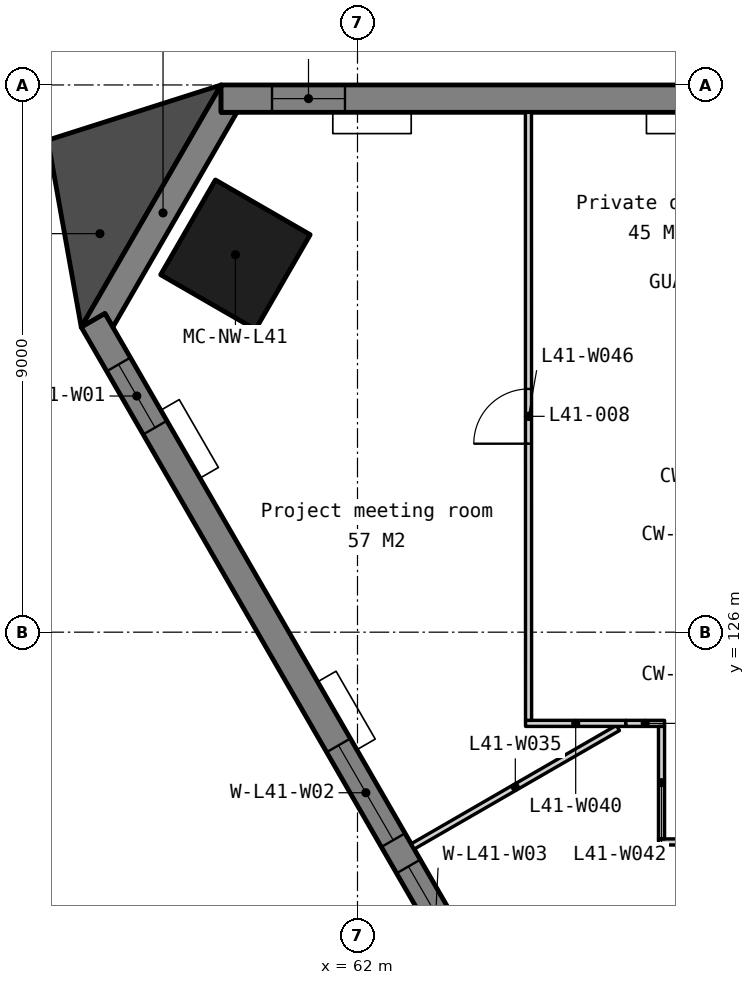
"""IFC4 building model, lengths in metres.
Left out: names, types, materials, properties, quantities, classifications, styles, units other than length and angle.
Written with IfcOpenShell. Run it as: python <this file> out.ifc"""

import sys

from ifc_helpers import new_model, si_unit, direction, frame, frame_2d, origin, origin_2d, place, context, subcontext, project, spatial, polyline, rectangle, outline, extrude, element, fill, save


model = new_model("IFC4")
c1 = context("Model", 3, precision=1e-05, world=origin(), true_north=direction((0.0, 1.0)))
c2 = subcontext(c1, "Body", "Model", "MODEL_VIEW")
j1 = project(units=[si_unit("LENGTHUNIT", "METRE"), si_unit("PLANEANGLEUNIT", "RADIAN")], contexts=[c1])
p1 = place(None, origin())
s1 = spatial("IfcSite", under=j1, at=p1, CompositionType="ELEMENT")
p2 = place(p1, origin())
s2 = spatial("IfcBuilding", under=s1, at=p2, CompositionType="ELEMENT")
p3 = place(p2, frame((0.0, 0.0, 163.7)))
s3 = spatial("IfcBuildingStorey", under=s2, at=p3, CompositionType="ELEMENT", Elevation=163.7)
p4 = place(p3, frame((59.993, 132.208, 0.0), z_axis=(0.0, 0.0, 1.0), x_axis=(-0.5, -0.866025403784, 0.0)))
e1 = element("IfcColumn", 1, at=p4, inside=s3, PredefinedType="COLUMN", context=c2, shape_type="SweptSolid", body=[
    extrude(rectangle(XDim=1.8, YDim=1.8, at=origin_2d()), origin(), (0.0, 0.0, 1.0), 3.9),
])
p5 = place(p3, frame((0.0, 0.0, -0.15)))
e2 = element("IfcWall", 2, at=p5, inside=s3, PredefinedType="SOLIDWALL", context=c2, shape_type="SweptSolid", body=[
    extrude(outline(polyline([(59.757, 135.0), (59.757, 134.55), (60.017, 134.55), (57.977, 131.016), (57.847, 131.241), (57.457, 131.016), (59.757, 135.0)])), origin(), (0.0, 0.0, 1.0), 3.9),
])
p6 = place(p3, frame((100.243, 134.775, -0.15), z_axis=(0.0, 0.0, 1.0), x_axis=(-1.0, 0.0, 0.0)))
e3 = element("IfcWall", 3, at=p6, inside=s3, PredefinedType="SOLIDWALL", context=c2, shape_type="SweptSolid", body=[
    extrude(outline(polyline([(40.486, 0.0), (40.486, 3.9), (0.0, 3.9), (0.0, 0.0), (40.486, 0.0)])), frame((0.0, 0.225, 0.0), z_axis=(0.0, -1.0, 0.0), x_axis=(1.0, 0.0, 0.0)), (0.0, 0.0, 1.0), 0.45),
])
p7 = place(p6, frame((0.837, 0.0, 0.95)))
e4 = element("IfcOpeningElement", 4, at=p7, cuts=e3, PredefinedType="OPENING", context=c2, shape_type="SweptSolid", body=[
    extrude(rectangle(XDim=1.2, YDim=2.2, at=frame_2d((0.6, 1.1))), frame((0.0, 0.235, 0.0), z_axis=(0.0, -1.0, 0.0), x_axis=(1.0, 0.0, 0.0)), (0.0, 0.0, 1.0), 0.47),
])
p8 = place(p6, frame((8.072, 0.0, 0.95)))
e5 = element("IfcOpeningElement", 5, at=p8, cuts=e3, PredefinedType="OPENING", context=c2, shape_type="SweptSolid", body=[
    extrude(rectangle(XDim=1.8, YDim=2.2, at=frame_2d((0.9, 1.1))), frame((0.0, 0.235, 0.0), z_axis=(0.0, -1.0, 0.0), x_axis=(1.0, 0.0, 0.0)), (0.0, 0.0, 1.0), 0.47),
])
p9 = place(p6, frame((10.372, 0.0, 0.95)))
e6 = element("IfcOpeningElement", 6, at=p9, cuts=e3, PredefinedType="OPENING", context=c2, shape_type="SweptSolid", body=[
    extrude(rectangle(XDim=1.8, YDim=2.2, at=frame_2d((0.9, 1.1))), frame((0.0, 0.235, 0.0), z_axis=(0.0, -1.0, 0.0), x_axis=(1.0, 0.0, 0.0)), (0.0, 0.0, 1.0), 0.47),
])
p10 = place(p6, frame((18.193, 0.0, 0.95)))
e7 = element("IfcOpeningElement", 7, at=p10, cuts=e3, PredefinedType="OPENING", context=c2, shape_type="SweptSolid", body=[
    extrude(rectangle(XDim=1.8, YDim=2.2, at=frame_2d((0.9, 1.1))), frame((0.0, 0.235, 0.0), z_axis=(0.0, -1.0, 0.0), x_axis=(1.0, 0.0, 0.0)), (0.0, 0.0, 1.0), 0.47),
])
p11 = place(p6, frame((20.493, 0.0, 0.95)))
e8 = element("IfcOpeningElement", 8, at=p11, cuts=e3, PredefinedType="OPENING", context=c2, shape_type="SweptSolid", body=[
    extrude(rectangle(XDim=1.8, YDim=2.2, at=frame_2d((0.9, 1.1))), frame((0.0, 0.235, 0.0), z_axis=(0.0, -1.0, 0.0), x_axis=(1.0, 0.0, 0.0)), (0.0, 0.0, 1.0), 0.47),
])
p12 = place(p6, frame((28.315, 0.0, 0.95)))
e9 = element("IfcOpeningElement", 9, at=p12, cuts=e3, PredefinedType="OPENING", context=c2, shape_type="SweptSolid", body=[
    extrude(rectangle(XDim=1.8, YDim=2.2, at=frame_2d((0.9, 1.1))), frame((0.0, 0.235, 0.0), z_axis=(0.0, -1.0, 0.0), x_axis=(1.0, 0.0, 0.0)), (0.0, 0.0, 1.0), 0.47),
])
p13 = place(p6, frame((30.615, 0.0, 0.95)))
e10 = element("IfcOpeningElement", 10, at=p13, cuts=e3, PredefinedType="OPENING", context=c2, shape_type="SweptSolid", body=[
    extrude(rectangle(XDim=1.8, YDim=2.2, at=frame_2d((0.9, 1.1))), frame((0.0, 0.235, 0.0), z_axis=(0.0, -1.0, 0.0), x_axis=(1.0, 0.0, 0.0)), (0.0, 0.0, 1.0), 0.47),
])
p14 = place(p6, frame((38.449, 0.0, 0.95)))
e11 = element("IfcOpeningElement", 11, at=p14, cuts=e3, PredefinedType="OPENING", context=c2, shape_type="SweptSolid", body=[
    extrude(rectangle(XDim=1.2, YDim=2.2, at=frame_2d((0.6, 1.1))), frame((0.0, 0.235, 0.0), z_axis=(0.0, -1.0, 0.0), x_axis=(1.0, 0.0, 0.0)), (0.0, 0.0, 1.0), 0.47),
])
p15 = place(p3, frame((57.652, 131.129, -0.15), z_axis=(0.0, 0.0, 1.0), x_axis=(0.499997369791, -0.866026922331, 0.0)))
e12 = element("IfcWall", 12, at=p15, inside=s3, PredefinedType="SOLIDWALL", context=c2, shape_type="SweptSolid", body=[
    extrude(outline(polyline([(40.486, 0.0), (40.486, 3.9), (0.0, 3.9), (0.0, 0.0), (40.486, 0.0)])), frame((0.0, 0.225, 0.0), z_axis=(0.0, -1.0, 0.0), x_axis=(1.0, 0.0, 0.0)), (0.0, 0.0, 1.0), 0.45),
])
p16 = place(p15, frame((0.837, 0.0, 0.95)))
e13 = element("IfcOpeningElement", 13, at=p16, cuts=e12, PredefinedType="OPENING", context=c2, shape_type="SweptSolid", body=[
    extrude(rectangle(XDim=1.2, YDim=2.2, at=frame_2d((0.6, 1.1))), frame((0.0, 0.235, 0.0), z_axis=(0.0, -1.0, 0.0), x_axis=(1.0, 0.0, 0.0)), (0.0, 0.0, 1.0), 0.47),
])
p17 = place(p15, frame((8.072, 0.0, 0.95)))
e14 = element("IfcOpeningElement", 14, at=p17, cuts=e12, PredefinedType="OPENING", context=c2, shape_type="SweptSolid", body=[
    extrude(rectangle(XDim=1.8, YDim=2.2, at=frame_2d((0.9, 1.1))), frame((0.0, 0.235, 0.0), z_axis=(0.0, -1.0, 0.0), x_axis=(1.0, 0.0, 0.0)), (0.0, 0.0, 1.0), 0.47),
])
p18 = place(p15, frame((10.372, 0.0, 0.95)))
e15 = element("IfcOpeningElement", 15, at=p18, cuts=e12, PredefinedType="OPENING", context=c2, shape_type="SweptSolid", body=[
    extrude(rectangle(XDim=1.8, YDim=2.2, at=frame_2d((0.9, 1.1))), frame((0.0, 0.235, 0.0), z_axis=(0.0, -1.0, 0.0), x_axis=(1.0, 0.0, 0.0)), (0.0, 0.0, 1.0), 0.47),
])
p19 = place(p15, frame((18.193, 0.0, 0.95)))
e16 = element("IfcOpeningElement", 16, at=p19, cuts=e12, PredefinedType="OPENING", context=c2, shape_type="SweptSolid", body=[
    extrude(rectangle(XDim=1.8, YDim=2.2, at=frame_2d((0.9, 1.1))), frame((0.0, 0.235, 0.0), z_axis=(0.0, -1.0, 0.0), x_axis=(1.0, 0.0, 0.0)), (0.0, 0.0, 1.0), 0.47),
])
p20 = place(p15, frame((20.493, 0.0, 0.95)))
e17 = element("IfcOpeningElement", 17, at=p20, cuts=e12, PredefinedType="OPENING", context=c2, shape_type="SweptSolid", body=[
    extrude(rectangle(XDim=1.8, YDim=2.2, at=frame_2d((0.9, 1.1))), frame((0.0, 0.235, 0.0), z_axis=(0.0, -1.0, 0.0), x_axis=(1.0, 0.0, 0.0)), (0.0, 0.0, 1.0), 0.47),
])
p21 = place(p15, frame((28.315, 0.0, 0.95)))
e18 = element("IfcOpeningElement", 18, at=p21, cuts=e12, PredefinedType="OPENING", context=c2, shape_type="SweptSolid", body=[
    extrude(rectangle(XDim=1.8, YDim=2.2, at=frame_2d((0.9, 1.1))), frame((0.0, 0.235, 0.0), z_axis=(0.0, -1.0, 0.0), x_axis=(1.0, 0.0, 0.0)), (0.0, 0.0, 1.0), 0.47),
])
p22 = place(p15, frame((30.615, 0.0, 0.95)))
e19 = element("IfcOpeningElement", 19, at=p22, cuts=e12, PredefinedType="OPENING", context=c2, shape_type="SweptSolid", body=[
    extrude(rectangle(XDim=1.8, YDim=2.2, at=frame_2d((0.9, 1.1))), frame((0.0, 0.235, 0.0), z_axis=(0.0, -1.0, 0.0), x_axis=(1.0, 0.0, 0.0)), (0.0, 0.0, 1.0), 0.47),
])
p23 = place(p15, frame((38.449, 0.0, 0.95)))
e20 = element("IfcOpeningElement", 20, at=p23, cuts=e12, PredefinedType="OPENING", context=c2, shape_type="SweptSolid", body=[
    extrude(rectangle(XDim=1.2, YDim=2.2, at=frame_2d((0.6, 1.1))), frame((0.0, 0.235, 0.0), z_axis=(0.0, -1.0, 0.0), x_axis=(1.0, 0.0, 0.0)), (0.0, 0.0, 1.0), 0.47),
])
p24 = place(p3, frame((0.0, 0.0, -0.15)))
e21 = element("IfcWall", 21, at=p24, inside=s3, PredefinedType="SOLIDWALL", context=c2, shape_type="SweptSolid", body=[
    extrude(outline(polyline([(59.757, 135.0), (56.908, 134.093), (57.457, 131.016), (59.757, 135.0)])), origin(), (0.0, 0.0, 1.0), 3.9),
])
p25 = place(p3, frame((65.438, 118.093, 0.0), z_axis=(0.0, 0.0, 1.0), x_axis=(0.866029768103, 0.499992440702, 0.0)))
e22 = element("IfcWall", 22, at=p25, inside=s3, PredefinedType="PARTITIONING", context=c2, shape_type="SweptSolid", body=[
    extrude(rectangle(XDim=8.089, YDim=0.1, at=frame_2d((4.044, 0.0))), origin(), (0.0, 0.0, 1.0), 3.75),
])
p26 = place(p25, frame((3.594, 0.0, 0.0)))
e23 = element("IfcOpeningElement", 23, at=p26, cuts=e22, PredefinedType="OPENING", context=c2, shape_type="SweptSolid", body=[
    extrude(rectangle(XDim=0.9, YDim=2.1, at=frame_2d((0.45, 1.05))), frame((0.0, 0.06, 0.0), z_axis=(0.0, -1.0, 0.0), x_axis=(1.0, 0.0, 0.0)), (0.0, 0.0, 1.0), 0.12),
])
p27 = place(p3, frame((62.907, 122.476, 0.0), z_axis=(0.0, 0.0, 1.0), x_axis=(0.866014543207, 0.500018810599, 0.0)))
e24 = element("IfcWall", 24, at=p27, inside=s3, PredefinedType="PARTITIONING", context=c2, shape_type="SweptSolid", body=[
    extrude(rectangle(XDim=3.898, YDim=0.1, at=frame_2d((1.949, 0.0))), origin(), (0.0, 0.0, 1.0), 3.75),
])
p28 = place(p3, frame((66.95, 122.55, 0.0), z_axis=(0.0, 0.0, 1.0), x_axis=(1.0, 0.0, 0.0)))
e25 = element("IfcWall", 25, at=p28, inside=s3, PredefinedType="PARTITIONING", context=c2, shape_type="SweptSolid", body=[
    extrude(rectangle(XDim=2.05, YDim=0.1, at=frame_2d((1.025, 0.0))), origin(), (0.0, 0.0, 1.0), 3.75),
])
p29 = place(p28, frame((0.575, 0.0, 0.0)))
e26 = element("IfcOpeningElement", 26, at=p29, cuts=e25, PredefinedType="OPENING", context=c2, shape_type="SweptSolid", body=[
    extrude(rectangle(XDim=0.9, YDim=2.1, at=frame_2d((0.45, 1.05))), frame((0.0, 0.06, 0.0), z_axis=(0.0, -1.0, 0.0), x_axis=(1.0, 0.0, 0.0)), (0.0, 0.0, 1.0), 0.12),
])
p30 = place(p3, frame((64.763, 124.5, 0.0), z_axis=(0.0, 0.0, 1.0), x_axis=(1.0, 0.0, 0.0)))
e27 = element("IfcWall", 27, at=p30, inside=s3, PredefinedType="PARTITIONING", context=c2, shape_type="SweptSolid", body=[
    extrude(rectangle(XDim=1.65, YDim=0.1, at=frame_2d((0.825, 0.0))), origin(), (0.0, 0.0, 1.0), 3.75),
])
p31 = place(p3, frame((66.414, 124.5, 0.0), z_axis=(0.0, 0.0, 1.0), x_axis=(1.0, 0.0, 0.0)))
e28 = element("IfcWall", 28, at=p31, inside=s3, PredefinedType="PARTITIONING", context=c2, shape_type="SweptSolid", body=[
    extrude(rectangle(XDim=0.636, YDim=0.1, at=frame_2d((0.318, 0.0))), origin(), (0.0, 0.0, 1.0), 3.75),
])
p32 = place(p3, frame((67.0, 122.6, 0.0), z_axis=(0.0, 0.0, 1.0), x_axis=(0.0, 1.0, 0.0)))
e29 = element("IfcWall", 29, at=p32, inside=s3, PredefinedType="PARTITIONING", context=c2, shape_type="SweptSolid", body=[
    extrude(rectangle(XDim=1.85, YDim=0.1, at=frame_2d((0.925, 0.0))), origin(), (0.0, 0.0, 1.0), 3.75),
])
p33 = place(p3, frame((64.813, 124.55, 0.0), z_axis=(0.0, 0.0, 1.0), x_axis=(-0.000195312496, 0.999999980927, 0.0)))
e30 = element("IfcWall", 30, at=p33, inside=s3, PredefinedType="PARTITIONING", context=c2, shape_type="SweptSolid", body=[
    extrude(rectangle(XDim=10.0, YDim=0.1, at=frame_2d((5.0, 0.0))), origin(), (0.0, 0.0, 1.0), 3.75),
])
p34 = place(p33, frame((4.55, 0.0, 0.0)))
e31 = element("IfcOpeningElement", 31, at=p34, cuts=e30, PredefinedType="OPENING", context=c2, shape_type="SweptSolid", body=[
    extrude(rectangle(XDim=0.9, YDim=2.1, at=frame_2d((0.45, 1.05))), frame((0.0, 0.06, 0.0), z_axis=(0.0, -1.0, 0.0), x_axis=(1.0, 0.0, 0.0)), (0.0, 0.0, 1.0), 0.12),
])
p35 = place(p14, origin())
e32 = element("IfcWindow", 32, at=p35, inside=s3, PartitioningType="SINGLE_PANEL", PredefinedType="WINDOW", context=c2, shape_type="SweptSolid", body=[
    extrude(rectangle(XDim=1.2, YDim=2.2, at=frame_2d((0.6, 1.1))), frame((0.0, 0.03, 0.0), z_axis=(0.0, -1.0, 0.0), x_axis=(1.0, 0.0, 0.0)), (0.0, 0.0, 1.0), 0.06),
])
fill(e11, e32)
p36 = place(p16, origin())
e33 = element("IfcWindow", 33, at=p36, inside=s3, PartitioningType="SINGLE_PANEL", PredefinedType="WINDOW", context=c2, shape_type="SweptSolid", body=[
    extrude(rectangle(XDim=1.2, YDim=2.2, at=frame_2d((0.6, 1.1))), frame((0.0, 0.03, 0.0), z_axis=(0.0, -1.0, 0.0), x_axis=(1.0, 0.0, 0.0)), (0.0, 0.0, 1.0), 0.06),
])
fill(e13, e33)
p37 = place(p17, origin())
e34 = element("IfcWindow", 34, at=p37, inside=s3, PartitioningType="SINGLE_PANEL", PredefinedType="WINDOW", context=c2, shape_type="SweptSolid", body=[
    extrude(rectangle(XDim=1.8, YDim=2.2, at=frame_2d((0.9, 1.1))), frame((0.0, 0.03, 0.0), z_axis=(0.0, -1.0, 0.0), x_axis=(1.0, 0.0, 0.0)), (0.0, 0.0, 1.0), 0.06),
])
fill(e14, e34)
p38 = place(p18, origin())
e35 = element("IfcWindow", 35, at=p38, inside=s3, PartitioningType="SINGLE_PANEL", PredefinedType="WINDOW", context=c2, shape_type="SweptSolid", body=[
    extrude(rectangle(XDim=1.8, YDim=2.2, at=frame_2d((0.9, 1.1))), frame((0.0, 0.03, 0.0), z_axis=(0.0, -1.0, 0.0), x_axis=(1.0, 0.0, 0.0)), (0.0, 0.0, 1.0), 0.06),
])
fill(e15, e35)
p39 = place(p34, origin())
e36 = element("IfcDoor", 36, at=p39, inside=s3, OperationType="SINGLE_SWING_LEFT", PredefinedType="DOOR", context=c2, shape_type="SweptSolid", body=[
    extrude(rectangle(XDim=0.9, YDim=2.1, at=frame_2d((0.45, 1.05))), frame((0.0, 0.025, 0.0), z_axis=(0.0, -1.0, 0.0), x_axis=(1.0, 0.0, 0.0)), (0.0, 0.0, 1.0), 0.05),
])
fill(e31, e36)
save(model, sys.argv[1])
